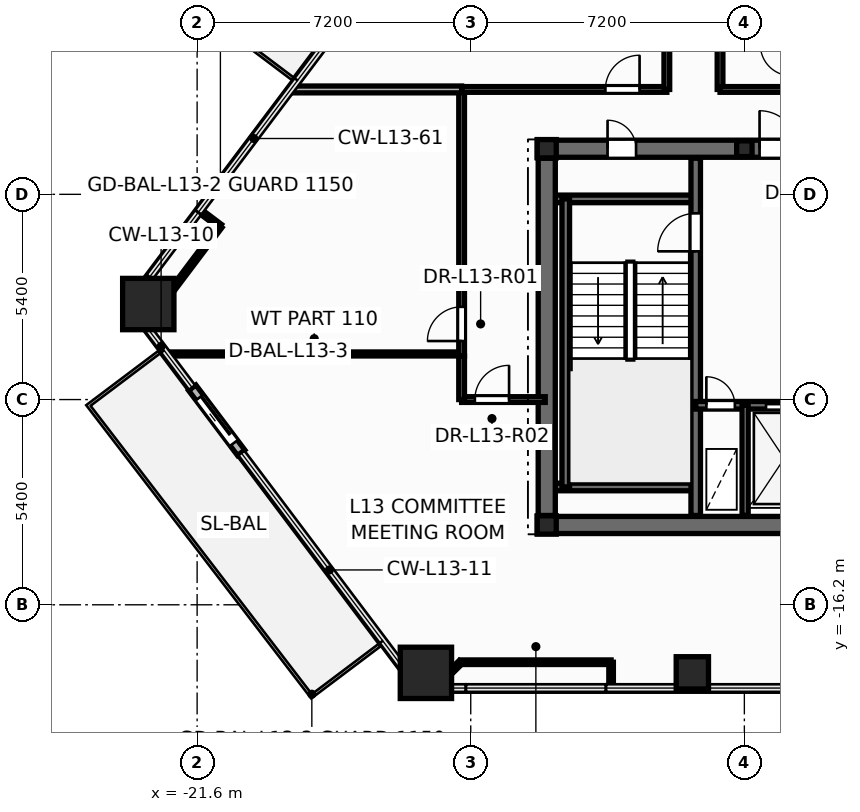
"""IFC4 building model, lengths in metres.
Left out: names, types, materials, properties, quantities, classifications, styles, units other than length and angle.
Written with IfcOpenShell. Run it as: python <this file> out.ifc"""

import sys

from ifc_helpers import new_model, si_unit, direction, frame, frame_2d, origin, origin_2d, place, context, subcontext, project, spatial, rectangle, hollow_rectangle, hollow_circle, i_section, extrude, element, fill, save


model = new_model("IFC4")
c1 = context("Model", 3, precision=1e-05, world=origin(), true_north=direction((0.0, 1.0)))
c2 = subcontext(c1, "Body", "Model", "MODEL_VIEW")
j1 = project(units=[si_unit("LENGTHUNIT", "METRE"), si_unit("PLANEANGLEUNIT", "RADIAN")], contexts=[c1])
p1 = place(None, origin())
s1 = spatial("IfcSite", under=j1, at=p1, CompositionType="ELEMENT")
p2 = place(p1, origin())
s2 = spatial("IfcBuilding", under=s1, at=p2, CompositionType="ELEMENT")
p3 = place(p2, frame((0.0, 0.0, 53.1)))
s3 = spatial("IfcBuildingStorey", under=s2, at=p3, CompositionType="ELEMENT", Elevation=53.1)
for number, where, z_axis, x_axis in (
    (1, (-22.885, -8.287, 0.0), (0.0, 0.0, 1.0), (1.0, 0.0, 0.0)),
    (2, (-15.58, -17.991, 0.0), (0.0, 0.0, 1.0), (1.0, 0.0, 0.0)),
):
    element("IfcColumn", number, at=place(p3, frame(where, z_axis=z_axis, x_axis=x_axis)), inside=s3, PredefinedType="COLUMN", context=c2, shape_type="SweptSolid", body=[
        extrude(hollow_rectangle(XDim=1.35, YDim=1.35, WallThickness=0.065, at=origin_2d()), origin(), (0.0, 0.0, 1.0), 3.6),
    ])
p4 = place(p3, frame((-8.569, -17.991, 0.0), z_axis=(0.0, 0.0, 1.0), x_axis=(1.0, 0.0, 0.0)))
e3 = element("IfcColumn", 3, at=p4, inside=s3, PredefinedType="COLUMN", context=c2, shape_type="SweptSolid", body=[
    extrude(hollow_circle(Radius=0.425, WallThickness=0.038, at=origin_2d()), origin(), (0.0, 0.0, 1.0), 3.6),
])
for number, where, z_axis, x_axis in (
    (4, (-12.4, -14.1, 0.0), (0.0, 0.0, 1.0), (1.0, 0.0, 0.0)),
    (5, (-12.4, -4.2, 0.0), (0.0, 0.0, 1.0), (1.0, 0.0, 0.0)),
):
    element("IfcColumn", number, at=place(p3, frame(where, z_axis=z_axis, x_axis=x_axis)), inside=s3, PredefinedType="COLUMN", context=c2, shape_type="SweptSolid", body=[
        extrude(i_section(OverallWidth=0.5, OverallDepth=0.482, WebThickness=0.04, FlangeThickness=0.045, at=origin_2d()), origin(), (0.0, 0.0, 1.0), 3.6),
    ])
p5 = place(p3, frame((-7.2, -4.2, 0.0), z_axis=(0.0, 0.0, 1.0), x_axis=(1.0, 0.0, 0.0)))
e6 = element("IfcColumn", 6, at=p5, inside=s3, PredefinedType="PILASTER", context=c2, shape_type="SweptSolid", body=[
    extrude(i_section(OverallWidth=0.405, OverallDepth=0.414, WebThickness=0.022, FlangeThickness=0.032, at=origin_2d()), origin(), (0.0, 0.0, 1.0), 3.6),
])
p6 = place(p3, frame((-21.728, -10.489, -0.015), z_axis=(0.0, 0.0, 1.0), x_axis=(0.601441023505, -0.798917201746, 0.0)))
e7 = element("IfcWall", 7, at=p6, inside=s3, PredefinedType="STANDARD", context=c2, shape_type="SweptSolid", body=[
    extrude(rectangle(XDim=2.14, YDim=0.24, at=frame_2d((1.07, 0.0))), origin(), (0.0, 0.0, 1.0), 2.729),
])
p7 = place(p6, frame((0.32, 0.0, 0.015)))
e8 = element("IfcOpeningElement", 8, at=p7, cuts=e7, PredefinedType="OPENING", context=c2, shape_type="SweptSolid", body=[
    extrude(rectangle(XDim=1.506, YDim=2.204, at=frame_2d((0.75, 1.102))), frame((0.0, 0.13, 0.0), z_axis=(0.0, -1.0, 0.0), x_axis=(1.0, 0.0, 0.0)), (0.0, 0.0, 1.0), 0.26),
])
p8 = place(p3, frame((-12.65, -14.1, 0.0), z_axis=(0.0, 0.0, 1.0), x_axis=(1.0, 0.0, 0.0)))
e9 = element("IfcWall", 9, at=p8, inside=s3, PredefinedType="SHEAR", context=c2, shape_type="SweptSolid", body=[
    extrude(rectangle(XDim=25.3, YDim=0.45, at=frame_2d((12.65, 0.0))), origin(), (0.0, 0.0, 1.0), 3.6),
])
p9 = place(p3, frame((-12.65, -4.2, 0.0), z_axis=(0.0, 0.0, 1.0), x_axis=(1.0, 0.0, 0.0)))
e10 = element("IfcWall", 10, at=p9, inside=s3, PredefinedType="SHEAR", context=c2, shape_type="SweptSolid", body=[
    extrude(rectangle(XDim=25.3, YDim=0.45, at=frame_2d((12.65, 0.0))), origin(), (0.0, 0.0, 1.0), 3.6),
])
p10 = place(p9, frame((1.85, 0.0, 0.0)))
e11 = element("IfcOpeningElement", 11, at=p10, cuts=e10, PredefinedType="OPENING", context=c2, shape_type="SweptSolid", body=[
    extrude(rectangle(XDim=0.756, YDim=2.054, at=frame_2d((0.375, 1.027))), frame((0.0, 0.235, 0.0), z_axis=(0.0, -1.0, 0.0), x_axis=(1.0, 0.0, 0.0)), (0.0, 0.0, 1.0), 0.47),
])
p11 = place(p9, frame((21.85, 0.0, 0.0)))
e12 = element("IfcOpeningElement", 12, at=p11, cuts=e10, PredefinedType="OPENING", context=c2, shape_type="SweptSolid", body=[
    extrude(rectangle(XDim=0.756, YDim=2.054, at=frame_2d((0.375, 1.027))), frame((0.0, 0.235, 0.0), z_axis=(0.0, -1.0, 0.0), x_axis=(1.0, 0.0, 0.0)), (0.0, 0.0, 1.0), 0.47),
])
p12 = place(p9, frame((23.5, 0.0, 0.0)))
e13 = element("IfcOpeningElement", 13, at=p12, cuts=e10, PredefinedType="OPENING", context=c2, shape_type="SweptSolid", body=[
    extrude(rectangle(XDim=0.756, YDim=2.054, at=frame_2d((0.375, 1.027))), frame((0.0, 0.235, 0.0), z_axis=(0.0, -1.0, 0.0), x_axis=(1.0, 0.0, 0.0)), (0.0, 0.0, 1.0), 0.47),
])
p13 = place(p9, frame((5.85, 0.0, 0.0)))
e14 = element("IfcOpeningElement", 14, at=p13, cuts=e10, PredefinedType="OPENING", context=c2, shape_type="SweptSolid", body=[
    extrude(rectangle(XDim=1.006, YDim=2.104, at=frame_2d((0.5, 1.052))), frame((0.0, 0.235, 0.0), z_axis=(0.0, -1.0, 0.0), x_axis=(1.0, 0.0, 0.0)), (0.0, 0.0, 1.0), 0.47),
])
p14 = place(p9, frame((10.35, 0.0, 0.0)))
e15 = element("IfcOpeningElement", 15, at=p14, cuts=e10, PredefinedType="OPENING", context=c2, shape_type="SweptSolid", body=[
    extrude(rectangle(XDim=1.406, YDim=2.154, at=frame_2d((0.7, 1.077))), frame((0.0, 0.235, 0.0), z_axis=(0.0, -1.0, 0.0), x_axis=(1.0, 0.0, 0.0)), (0.0, 0.0, 1.0), 0.47),
])
p15 = place(p9, frame((18.45, 0.0, 0.0)))
e16 = element("IfcOpeningElement", 16, at=p15, cuts=e10, PredefinedType="OPENING", context=c2, shape_type="SweptSolid", body=[
    extrude(rectangle(XDim=1.006, YDim=2.104, at=frame_2d((0.5, 1.052))), frame((0.0, 0.235, 0.0), z_axis=(0.0, -1.0, 0.0), x_axis=(1.0, 0.0, 0.0)), (0.0, 0.0, 1.0), 0.47),
])
for number, where, z_axis, x_axis in (
    (17, (-12.35, -5.52, 0.0), (0.0, 0.0, 1.0), (1.0, 0.0, 0.0)),
    (18, (-12.35, -13.1, 0.0), (0.0, 0.0, 1.0), (1.0, 0.0, 0.0)),
):
    element("IfcWall", number, at=place(p3, frame(where, z_axis=z_axis, x_axis=x_axis)), inside=s3, PredefinedType="SOLIDWALL", context=c2, shape_type="SweptSolid", body=[
        extrude(rectangle(XDim=3.87, YDim=0.2, at=frame_2d((1.935, 0.0))), origin(), (0.0, 0.0, 1.0), 3.6),
    ])
p16 = place(p3, frame((-11.9, -13.1, 0.0), z_axis=(0.0, 0.0, 1.0), x_axis=(0.0, 1.0, 0.0)))
e19 = element("IfcWall", 19, at=p16, inside=s3, PredefinedType="SOLIDWALL", context=c2, shape_type="SweptSolid", body=[
    extrude(rectangle(XDim=7.58, YDim=0.2, at=frame_2d((3.79, 0.0))), origin(), (0.0, 0.0, 1.0), 3.6),
])
p17 = place(p3, frame((-8.48, -13.85, 0.0), z_axis=(0.0, 0.0, 1.0), x_axis=(0.0, 1.0, 0.0)))
e20 = element("IfcWall", 20, at=p17, inside=s3, PredefinedType="SHEAR", context=c2, shape_type="SweptSolid", body=[
    extrude(rectangle(XDim=9.4, YDim=0.25, at=frame_2d((4.7, 0.0))), origin(), (0.0, 0.0, 1.0), 3.6),
])
p18 = place(p17, frame((6.95, 0.0, 0.0)))
e21 = element("IfcOpeningElement", 21, at=p18, cuts=e20, PredefinedType="OPENING", context=c2, shape_type="SweptSolid", body=[
    extrude(rectangle(XDim=1.006, YDim=2.104, at=frame_2d((0.5, 1.052))), frame((0.0, 0.135, 0.0), z_axis=(0.0, -1.0, 0.0), x_axis=(1.0, 0.0, 0.0)), (0.0, 0.0, 1.0), 0.27),
])
p19 = place(p3, frame((-8.48, -10.95, 0.0), z_axis=(0.0, 0.0, 1.0), x_axis=(1.0, 0.0, 0.0)))
e22 = element("IfcWall", 22, at=p19, inside=s3, PredefinedType="SOLIDWALL", context=c2, shape_type="SweptSolid", body=[
    extrude(rectangle(XDim=3.36, YDim=0.2, at=frame_2d((1.68, 0.0))), origin(), (0.0, 0.0, 1.0), 3.6),
])
p20 = place(p19, frame((0.28, 0.0, 0.0)))
e23 = element("IfcOpeningElement", 23, at=p20, cuts=e22, PredefinedType="OPENING", context=c2, shape_type="SweptSolid", body=[
    extrude(rectangle(XDim=0.756, YDim=2.054, at=frame_2d((0.375, 1.027))), frame((0.0, 0.11, 0.0), z_axis=(0.0, -1.0, 0.0), x_axis=(1.0, 0.0, 0.0)), (0.0, 0.0, 1.0), 0.22),
])
p21 = place(p19, frame((1.85, 0.0, 0.0)))
e24 = element("IfcOpeningElement", 24, at=p21, cuts=e22, PredefinedType="OPENING", context=c2, shape_type="SweptSolid", body=[
    extrude(rectangle(XDim=1.106, YDim=2.104, at=frame_2d((0.55, 1.052))), frame((0.0, 0.11, 0.0), z_axis=(0.0, -1.0, 0.0), x_axis=(1.0, 0.0, 0.0)), (0.0, 0.0, 1.0), 0.22),
])
p22 = place(p3, frame((-7.18, -13.85, 0.0), z_axis=(0.0, 0.0, 1.0), x_axis=(0.0, 1.0, 0.0)))
e25 = element("IfcWall", 25, at=p22, inside=s3, PredefinedType="PARTITIONING", context=c2, shape_type="SweptSolid", body=[
    extrude(rectangle(XDim=2.9, YDim=0.16, at=frame_2d((1.45, 0.0))), origin(), (0.0, 0.0, 1.0), 2.375),
])
p23 = place(p3, frame((-12.4, -13.85, 0.0), z_axis=(0.0, 0.0, 1.0), x_axis=(0.0, 1.0, 0.0)))
e26 = element("IfcWall", 26, at=p23, inside=s3, PredefinedType="SHEAR", context=c2, shape_type="SweptSolid", body=[
    extrude(rectangle(XDim=9.4, YDim=0.45, at=frame_2d((4.7, 0.0))), origin(), (0.0, 0.0, 1.0), 3.6),
])
p24 = place(p3, frame((-22.397, -9.6, 0.0), z_axis=(0.0, 0.0, 1.0), x_axis=(1.0, 0.0, 0.0)))
e27 = element("IfcWall", 27, at=p24, inside=s3, PredefinedType="PARTITIONING", context=c2, shape_type="SweptSolid", body=[
    extrude(rectangle(XDim=7.757, YDim=0.105, at=frame_2d((3.879, 0.0))), origin(), (0.0, 0.0, 1.0), 2.713),
])
p25 = place(p3, frame((-14.64, -9.66, 0.0), z_axis=(0.0, 0.0, 1.0), x_axis=(0.0, 1.0, 0.0)))
e28 = element("IfcWall", 28, at=p25, inside=s3, PredefinedType="PARTITIONING", context=c2, shape_type="SweptSolid", body=[
    extrude(rectangle(XDim=7.02, YDim=0.15, at=frame_2d((3.51, 0.0))), origin(), (0.0, 0.0, 1.0), 2.325),
])
p26 = place(p25, frame((0.4, 0.0, 0.0)))
e29 = element("IfcOpeningElement", 29, at=p26, cuts=e28, PredefinedType="OPENING", context=c2, shape_type="SweptSolid", body=[
    extrude(rectangle(XDim=0.906, YDim=2.104, at=frame_2d((0.45, 1.052))), frame((0.0, 0.085, 0.0), z_axis=(0.0, -1.0, 0.0), x_axis=(1.0, 0.0, 0.0)), (0.0, 0.0, 1.0), 0.17),
])
p27 = place(p3, frame((-7.84, -2.64, 0.0), z_axis=(0.0, 0.0, 1.0), x_axis=(0.0, 1.0, 0.0)))
e30 = element("IfcWall", 30, at=p27, inside=s3, PredefinedType="PARTITIONING", context=c2, shape_type="SweptSolid", body=[
    extrude(rectangle(XDim=8.84, YDim=0.15, at=frame_2d((4.42, 0.0))), origin(), (0.0, 0.0, 1.0), 2.509),
])
p28 = place(p3, frame((-14.64, -2.64, 0.0), z_axis=(0.0, 0.0, 1.0), x_axis=(1.0, 0.0, 0.0)))
e31 = element("IfcWall", 31, at=p28, inside=s3, PredefinedType="PARTITIONING", context=c2, shape_type="SweptSolid", body=[
    extrude(rectangle(XDim=5.4, YDim=0.15, at=frame_2d((2.7, 0.0))), origin(), (0.0, 0.0, 1.0), 3.35),
])
p29 = place(p28, frame((3.783, 0.0, 0.0)))
e32 = element("IfcOpeningElement", 32, at=p29, cuts=e31, PredefinedType="OPENING", context=c2, shape_type="SweptSolid", body=[
    extrude(rectangle(XDim=0.906, YDim=2.104, at=frame_2d((0.45, 1.052))), frame((0.0, 0.085, 0.0), z_axis=(0.0, -1.0, 0.0), x_axis=(1.0, 0.0, 0.0)), (0.0, 0.0, 1.0), 0.17),
])
p30 = place(p3, frame((-9.24, -2.64, 0.0), z_axis=(0.0, 0.0, 1.0), x_axis=(0.0, 1.0, 0.0)))
e33 = element("IfcWall", 33, at=p30, inside=s3, PredefinedType="PARTITIONING", context=c2, shape_type="SweptSolid", body=[
    extrude(rectangle(XDim=8.84, YDim=0.15, at=frame_2d((4.42, 0.0))), origin(), (0.0, 0.0, 1.0), 2.509),
])
p31 = place(p3, frame((-19.135, -2.64, 0.0), z_axis=(0.0, 0.0, 1.0), x_axis=(1.0, 0.0, 0.0)))
e34 = element("IfcWall", 34, at=p31, inside=s3, PredefinedType="PARTITIONING", context=c2, shape_type="SweptSolid", body=[
    extrude(rectangle(XDim=4.495, YDim=0.18, at=frame_2d((2.248, 0.0))), origin(), (0.0, 0.0, 1.0), 2.713),
])
p32 = place(p3, frame((-14.666, -17.711, 0.0), z_axis=(0.0, 0.0, 1.0), x_axis=(1.0, 0.0, 0.0)))
e35 = element("IfcWall", 35, at=p32, inside=s3, PredefinedType="PARTITIONING", context=c2, shape_type="SweptSolid", body=[
    extrude(rectangle(XDim=3.959, YDim=0.12, at=frame_2d((1.979, 0.0))), origin(), (0.0, 0.0, 1.0), 3.35),
])
p33 = place(p3, frame((-20.994, -6.239, 0.0), z_axis=(0.0, 0.0, 1.0), x_axis=(-0.601407243549, -0.798942630861, 0.0)))
e36 = element("IfcWall", 36, at=p33, inside=s3, PredefinedType="PARTITIONING", context=c2, shape_type="SweptSolid", body=[
    extrude(rectangle(XDim=2.247, YDim=0.12, at=frame_2d((1.124, 0.0))), origin(), (0.0, 0.0, 1.0), 2.325),
])
p34 = place(p3, frame((-14.64, -10.8, 0.0), z_axis=(0.0, 0.0, 1.0), x_axis=(1.0, 0.0, 0.0)))
e37 = element("IfcWall", 37, at=p34, inside=s3, PredefinedType="PARTITIONING", context=c2, shape_type="SweptSolid", body=[
    extrude(rectangle(XDim=2.2, YDim=0.15, at=frame_2d((1.1, 0.0))), origin(), (0.0, 0.0, 1.0), 2.713),
])
p35 = place(p34, frame((0.349, 0.0, 0.0)))
e38 = element("IfcOpeningElement", 38, at=p35, cuts=e37, PredefinedType="OPENING", context=c2, shape_type="SweptSolid", body=[
    extrude(rectangle(XDim=0.906, YDim=2.104, at=frame_2d((0.45, 1.052))), frame((0.0, 0.085, 0.0), z_axis=(0.0, -1.0, 0.0), x_axis=(1.0, 0.0, 0.0)), (0.0, 0.0, 1.0), 0.17),
])
p36 = place(p3, frame((-7.84, -2.64, 0.0), z_axis=(0.0, 0.0, 1.0), x_axis=(1.0, 0.0, 0.0)))
e39 = element("IfcWall", 39, at=p36, inside=s3, PredefinedType="PARTITIONING", context=c2, shape_type="SweptSolid", body=[
    extrude(rectangle(XDim=1.838, YDim=0.15, at=frame_2d((0.919, 0.0))), origin(), (0.0, 0.0, 1.0), 2.325),
])
p37 = place(p3, frame((-14.64, -10.8, 0.0), z_axis=(0.0, 0.0, 1.0), x_axis=(0.0, 1.0, 0.0)))
e40 = element("IfcWall", 40, at=p37, inside=s3, PredefinedType="PARTITIONING", context=c2, shape_type="SweptSolid", body=[
    extrude(rectangle(XDim=1.138, YDim=0.15, at=frame_2d((0.569, 0.0))), origin(), (0.0, 0.0, 1.0), 3.35),
])
p38 = place(p3, frame((-15.271, -18.307, 0.0), z_axis=(0.0, 0.0, 1.0), x_axis=(0.712544720488, 0.701626696545, 0.0)))
e41 = element("IfcWall", 41, at=p38, inside=s3, PredefinedType="PARTITIONING", context=c2, shape_type="SweptSolid", body=[
    extrude(rectangle(XDim=0.85, YDim=0.12, at=frame_2d((0.425, 0.0))), origin(), (0.0, 0.0, 1.0), 2.713),
])
p39 = place(p3, frame((-22.345, -8.034, 0.0), z_axis=(0.0, 0.0, 1.0), x_axis=(-0.993721326988, -0.111883530014, 0.0)))
e42 = element("IfcWall", 42, at=p39, inside=s3, PredefinedType="PARTITIONING", context=c2, shape_type="SweptSolid", body=[
    extrude(rectangle(XDim=0.849, YDim=0.12, at=frame_2d((0.424, 0.0))), origin(), (0.0, 0.0, 1.0), 2.325),
])
for number, where, z_axis, x_axis in (
    (43, (-10.707, -17.711, 0.0), (0.0, 0.0, 1.0), (0.0, -1.0, 0.0)),
    (44, (-21.529, -5.836, 0.0), (0.0, 0.0, 1.0), (0.799, -0.602, 0.0)),
):
    element("IfcWall", number, at=place(p3, frame(where, z_axis=z_axis, x_axis=x_axis)), inside=s3, PredefinedType="PARTITIONING", context=c2, shape_type="SweptSolid", body=[
        extrude(rectangle(XDim=0.67, YDim=0.12, at=frame_2d((0.335, 0.0))), origin(), (0.0, 0.0, 1.0), 2.713),
    ])
p40 = place(p7, origin())
e45 = element("IfcDoor", 45, at=p40, inside=s3, OperationType="SLIDING_TO_RIGHT", PredefinedType="DOOR", context=c2, shape_type="SweptSolid", body=[
    extrude(rectangle(XDim=1.5, YDim=2.2, at=frame_2d((0.75, 1.1))), frame((0.0, 0.025, 0.0), z_axis=(0.0, -1.0, 0.0), x_axis=(1.0, 0.0, 0.0)), (0.0, 0.0, 1.0), 0.05),
])
fill(e8, e45)
p41 = place(p18, origin())
e46 = element("IfcDoor", 46, at=p41, inside=s3, OperationType="SINGLE_SWING_LEFT", PredefinedType="DOOR", context=c2, shape_type="SweptSolid", body=[
    extrude(rectangle(XDim=1.0, YDim=2.1, at=frame_2d((0.5, 1.05))), frame((0.0, 0.025, 0.0), z_axis=(0.0, -1.0, 0.0), x_axis=(1.0, 0.0, 0.0)), (0.0, 0.0, 1.0), 0.05),
])
fill(e21, e46)
p42 = place(p20, origin())
e47 = element("IfcDoor", 47, at=p42, inside=s3, OperationType="SINGLE_SWING_LEFT", PredefinedType="DOOR", context=c2, shape_type="SweptSolid", body=[
    extrude(rectangle(XDim=0.75, YDim=2.05, at=frame_2d((0.375, 1.025))), frame((0.0, 0.025, 0.0), z_axis=(0.0, -1.0, 0.0), x_axis=(1.0, 0.0, 0.0)), (0.0, 0.0, 1.0), 0.05),
])
fill(e23, e47)
p43 = place(p21, origin())
e48 = element("IfcDoor", 48, at=p43, inside=s3, OperationType="DOUBLE_DOOR_SLIDING", PredefinedType="DOOR", context=c2, shape_type="SweptSolid", body=[
    extrude(rectangle(XDim=1.1, YDim=2.1, at=frame_2d((0.55, 1.05))), frame((0.0, 0.025, 0.0), z_axis=(0.0, -1.0, 0.0), x_axis=(1.0, 0.0, 0.0)), (0.0, 0.0, 1.0), 0.05),
])
fill(e24, e48)
p44 = place(p10, origin())
e49 = element("IfcDoor", 49, at=p44, inside=s3, OperationType="SINGLE_SWING_LEFT", PredefinedType="DOOR", context=c2, shape_type="SweptSolid", body=[
    extrude(rectangle(XDim=0.75, YDim=2.05, at=frame_2d((0.375, 1.025))), frame((0.0, 0.025, 0.0), z_axis=(0.0, -1.0, 0.0), x_axis=(1.0, 0.0, 0.0)), (0.0, 0.0, 1.0), 0.05),
])
fill(e11, e49)
p45 = place(p13, origin())
e50 = element("IfcDoor", 50, at=p45, inside=s3, OperationType="SINGLE_SWING_LEFT", PredefinedType="DOOR", context=c2, shape_type="SweptSolid", body=[
    extrude(rectangle(XDim=1.0, YDim=2.1, at=frame_2d((0.5, 1.05))), frame((0.0, 0.025, 0.0), z_axis=(0.0, -1.0, 0.0), x_axis=(1.0, 0.0, 0.0)), (0.0, 0.0, 1.0), 0.05),
])
fill(e14, e50)
p46 = place(p26, origin())
e51 = element("IfcDoor", 51, at=p46, inside=s3, OperationType="SINGLE_SWING_LEFT", PredefinedType="DOOR", context=c2, shape_type="SweptSolid", body=[
    extrude(rectangle(XDim=0.9, YDim=2.1, at=frame_2d((0.45, 1.05))), frame((0.0, 0.025, 0.0), z_axis=(0.0, -1.0, 0.0), x_axis=(1.0, 0.0, 0.0)), (0.0, 0.0, 1.0), 0.05),
])
fill(e29, e51)
p47 = place(p35, origin())
e52 = element("IfcDoor", 52, at=p47, inside=s3, OperationType="SINGLE_SWING_RIGHT", PredefinedType="DOOR", context=c2, shape_type="SweptSolid", body=[
    extrude(rectangle(XDim=0.9, YDim=2.1, at=frame_2d((0.45, 1.05))), frame((0.0, 0.025, 0.0), z_axis=(0.0, -1.0, 0.0), x_axis=(1.0, 0.0, 0.0)), (0.0, 0.0, 1.0), 0.05),
])
fill(e38, e52)
p48 = place(p29, origin())
e53 = element("IfcDoor", 53, at=p48, inside=s3, OperationType="SINGLE_SWING_RIGHT", PredefinedType="DOOR", context=c2, shape_type="SweptSolid", body=[
    extrude(rectangle(XDim=0.9, YDim=2.1, at=frame_2d((0.45, 1.05))), frame((0.0, 0.025, 0.0), z_axis=(0.0, -1.0, 0.0), x_axis=(1.0, 0.0, 0.0)), (0.0, 0.0, 1.0), 0.05),
])
fill(e32, e53)
save(model, sys.argv[1])
